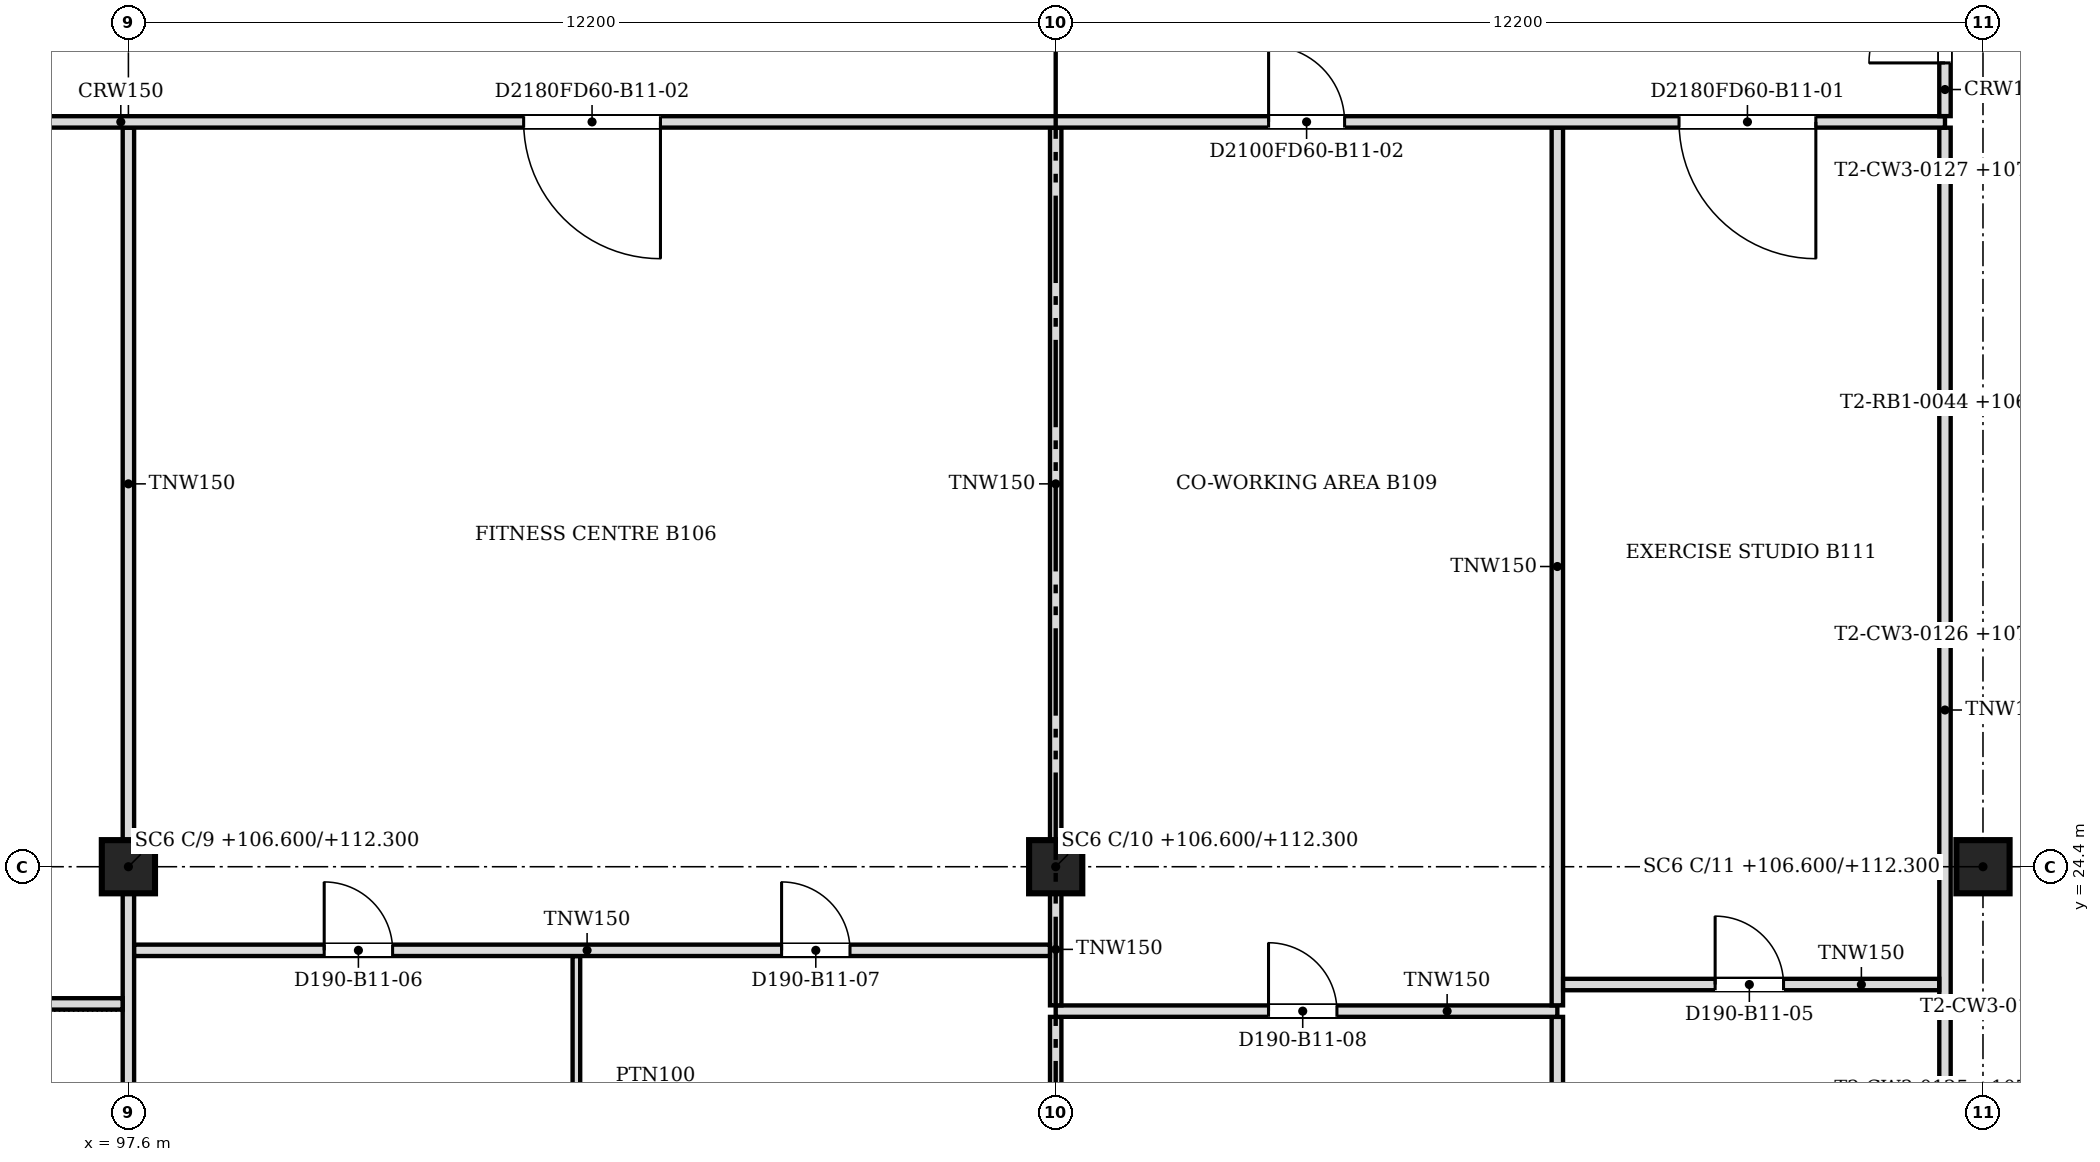
"""IFC4 building model, lengths in metres.
Left out: names, types, materials, properties, quantities, classifications, styles, units other than length and angle.
Written with IfcOpenShell. Run it as: python <this file> out.ifc"""

import sys

from ifc_helpers import new_model, si_unit, direction, frame, frame_2d, origin, origin_2d, place, context, subcontext, project, spatial, rectangle, extrude, source, transform, mapped, element, fill, save


model = new_model("IFC4")
c1 = context("Model", 3, precision=1e-05, world=origin(), true_north=direction((0.0, 1.0)))
c2 = subcontext(c1, "Body", "Model", "MODEL_VIEW")
j1 = project(units=[si_unit("LENGTHUNIT", "METRE"), si_unit("PLANEANGLEUNIT", "RADIAN")], contexts=[c1])
p1 = place(None, origin())
s1 = spatial("IfcSite", under=j1, at=p1, CompositionType="ELEMENT")
p2 = place(p1, origin())
s2 = spatial("IfcBuilding", under=s1, at=p2, CompositionType="ELEMENT")
p3 = place(p2, frame((0.0, 0.0, 106.6)))
s3 = spatial("IfcBuildingStorey", under=s2, at=p3, CompositionType="ELEMENT", Elevation=106.6)
for number, where, z_axis, x_axis in (
    (1, (97.6, 24.4, 0.0), (0.0, 0.0, 1.0), (1.0, 0.0, 0.0)),
    (2, (109.8, 24.4, 0.0), (0.0, 0.0, 1.0), (1.0, 0.0, 0.0)),
    (3, (122.0, 24.4, 0.0), (0.0, 0.0, 1.0), (1.0, 0.0, 0.0)),
):
    element("IfcColumn", number, at=place(p3, frame(where, z_axis=z_axis, x_axis=x_axis)), inside=s3, PredefinedType="COLUMN", context=c2, shape_type="SweptSolid", body=[
        extrude(rectangle(XDim=0.7, YDim=0.7, at=origin_2d()), origin(), (0.0, 0.0, 1.0), 5.7),
    ])
p4 = place(p3, frame((97.6, 18.8, 0.0), z_axis=(0.0, 0.0, 1.0), x_axis=(0.0, 1.0, 0.0)))
e4 = element("IfcWall", 4, at=p4, inside=s3, PredefinedType="PARTITIONING", context=c2, shape_type="SweptSolid", body=[
    extrude(rectangle(XDim=5.249, YDim=0.15, at=frame_2d((2.625, 0.0))), origin(), (0.0, 0.0, 1.0), 5.167),
])
p5 = place(p3, frame((103.494, 18.8, 0.0), z_axis=(0.0, 0.0, 1.0), x_axis=(0.0, 1.0, 0.0)))
e5 = element("IfcWall", 5, at=p5, inside=s3, PredefinedType="PARTITIONING", context=c2, shape_type="SweptSolid", body=[
    extrude(rectangle(XDim=4.424, YDim=0.1, at=frame_2d((2.212, 0.0))), origin(), (0.0, 0.0, 1.0), 5.167),
])
for number, where, z_axis, x_axis in (
    (6, (109.8, 18.8, 0.0), (0.0, 0.0, 1.0), (0.0, 1.0, 0.0)),
    (7, (116.4, 18.8, 0.0), (0.0, 0.0, 1.0), (0.0, 1.0, 0.0)),
):
    element("IfcWall", number, at=place(p3, frame(where, z_axis=z_axis, x_axis=x_axis)), inside=s3, PredefinedType="PARTITIONING", context=c2, shape_type="SweptSolid", body=[
        extrude(rectangle(XDim=3.624, YDim=0.15, at=frame_2d((1.812, 0.0))), origin(), (0.0, 0.0, 1.0), 5.167),
    ])
p6 = place(p3, frame((121.5, 18.8, 0.0), z_axis=(0.0, 0.0, 1.0), x_axis=(0.0, 1.0, 0.0)))
e8 = element("IfcWall", 8, at=p6, inside=s3, PredefinedType="PARTITIONING", context=c2, shape_type="SweptSolid", body=[
    extrude(rectangle(XDim=15.324, YDim=0.15, at=frame_2d((7.662, 0.0))), origin(), (0.0, 0.0, 1.0), 5.167),
])
p7 = place(p3, frame((116.4, 22.5, 0.0), z_axis=(0.0, 0.0, 1.0), x_axis=(-1.0, 0.0, 0.0)))
e9 = element("IfcWall", 9, at=p7, inside=s3, PredefinedType="PARTITIONING", context=c2, shape_type="SweptSolid", body=[
    extrude(rectangle(XDim=6.6, YDim=0.15, at=frame_2d((3.3, 0.0))), origin(), (0.0, 0.0, 1.0), 5.167),
])
m1 = source(origin(), c2, "Body", "SweptSolid", [
    extrude(rectangle(XDim=0.9, YDim=2.1, at=frame_2d((0.45, 1.05))), frame((0.0, 0.085, 0.0), z_axis=(0.0, -1.0, 0.0), x_axis=(1.0, 0.0, 0.0)), (0.0, 0.0, 1.0), 0.17),
])
p8 = place(p7, frame((2.9, 0.0, 0.0)))
e10 = element("IfcOpeningElement", 10, at=p8, cuts=e9, PredefinedType="OPENING", context=c2, shape_type="MappedRepresentation", body=[
    mapped(m1, transform((0.0, 0.0, 0.0), scale=1.0)),
])
p9 = place(p3, frame((97.524, 22.595, 0.0), z_axis=(0.0, 0.0, 1.0), x_axis=(-1.0, 0.0, 0.0)))
e11 = element("IfcWall", 11, at=p9, inside=s3, PredefinedType="PARTITIONING", context=c2, shape_type="SweptSolid", body=[
    extrude(rectangle(XDim=10.884, YDim=0.15, at=frame_2d((5.442, 0.0))), origin(), (0.0, 0.0, 1.0), 5.167),
])
p10 = place(p9, frame((8.884, 0.0, 0.0)))
e12 = element("IfcOpeningElement", 12, at=p10, cuts=e11, PredefinedType="OPENING", context=c2, shape_type="MappedRepresentation", body=[
    mapped(m1, transform((0.0, 0.0, 0.0), scale=1.0)),
])
p11 = place(p9, frame((1.35, 0.0, 0.0)))
e13 = element("IfcOpeningElement", 13, at=p11, cuts=e11, PredefinedType="OPENING", context=c2, shape_type="MappedRepresentation", body=[
    mapped(m1, transform((0.0, 0.0, 0.0), scale=1.0)),
])
p12 = place(p9, frame((5.224, 0.0, 0.0)))
e14 = element("IfcOpeningElement", 14, at=p12, cuts=e11, PredefinedType="OPENING", context=c2, shape_type="MappedRepresentation", body=[
    mapped(m1, transform((0.0, 0.0, 0.0), scale=1.0)),
])
p13 = place(p3, frame((109.8, 22.576, 0.0), z_axis=(0.0, 0.0, 1.0), x_axis=(0.0, 1.0, 0.0)))
e15 = element("IfcWall", 15, at=p13, inside=s3, PredefinedType="PARTITIONING", context=c2, shape_type="SweptSolid", body=[
    extrude(rectangle(XDim=1.473, YDim=0.15, at=frame_2d((0.737, 0.0))), origin(), (0.0, 0.0, 1.0), 5.167),
])
p14 = place(p3, frame((116.4, 22.576, 0.0), z_axis=(0.0, 0.0, 1.0), x_axis=(0.0, 1.0, 0.0)))
e16 = element("IfcWall", 16, at=p14, inside=s3, PredefinedType="PARTITIONING", context=c2, shape_type="SweptSolid", body=[
    extrude(rectangle(XDim=11.548, YDim=0.15, at=frame_2d((5.774, 0.0))), origin(), (0.0, 0.0, 1.0), 5.167),
])
p15 = place(p3, frame((121.424, 22.85, 0.0), z_axis=(0.0, 0.0, 1.0), x_axis=(-1.0, 0.0, 0.0)))
e17 = element("IfcWall", 17, at=p15, inside=s3, PredefinedType="PARTITIONING", context=c2, shape_type="SweptSolid", body=[
    extrude(rectangle(XDim=4.948, YDim=0.15, at=frame_2d((2.474, 0.0))), origin(), (0.0, 0.0, 1.0), 5.167),
])
p16 = place(p15, frame((2.048, 0.0, 0.0)))
e18 = element("IfcOpeningElement", 18, at=p16, cuts=e17, PredefinedType="OPENING", context=c2, shape_type="MappedRepresentation", body=[
    mapped(m1, transform((0.0, 0.0, 0.0), scale=1.0)),
])
p17 = place(p3, frame((109.724, 23.3, 0.0), z_axis=(0.0, 0.0, 1.0), x_axis=(-1.0, 0.0, 0.0)))
e19 = element("IfcWall", 19, at=p17, inside=s3, PredefinedType="PARTITIONING", context=c2, shape_type="SweptSolid", body=[
    extrude(rectangle(XDim=12.048, YDim=0.15, at=frame_2d((6.024, 0.0))), origin(), (0.0, 0.0, 1.0), 5.167),
])
p18 = place(p17, frame((8.648, 0.0, 0.0)))
e20 = element("IfcOpeningElement", 20, at=p18, cuts=e19, PredefinedType="OPENING", context=c2, shape_type="MappedRepresentation", body=[
    mapped(m1, transform((0.0, 0.0, 0.0), scale=1.0)),
])
p19 = place(p17, frame((2.63, 0.0, 0.0)))
e21 = element("IfcOpeningElement", 21, at=p19, cuts=e19, PredefinedType="OPENING", context=c2, shape_type="MappedRepresentation", body=[
    mapped(m1, transform((0.0, 0.0, 0.0), scale=1.0)),
])
for number, where, z_axis, x_axis in (
    (22, (97.6, 24.751, 0.0), (0.0, 0.0, 1.0), (0.0, 1.0, 0.0)),
    (23, (109.8, 24.751, 0.0), (0.0, 0.0, 1.0), (0.0, 1.0, 0.0)),
):
    element("IfcWall", number, at=place(p3, frame(where, z_axis=z_axis, x_axis=x_axis)), inside=s3, PredefinedType="PARTITIONING", context=c2, shape_type="SweptSolid", body=[
        extrude(rectangle(XDim=9.373, YDim=0.15, at=frame_2d((4.687, 0.0))), origin(), (0.0, 0.0, 1.0), 5.167),
    ])
p20 = place(p3, frame((121.5, 34.2, 0.0), z_axis=(0.0, 0.0, 1.0), x_axis=(-1.0, 0.0, 0.0)))
e24 = element("IfcWall", 24, at=p20, inside=s3, PredefinedType="PARTITIONING", context=c2, shape_type="SweptSolid", body=[
    extrude(rectangle(XDim=35.6, YDim=0.15, at=frame_2d((17.8, 0.0))), origin(), (0.0, 0.0, 1.0), 5.167),
])
m2 = source(origin(), c2, "Body", "SweptSolid", [
    extrude(rectangle(XDim=1.8, YDim=2.1, at=frame_2d((0.9, 1.05))), frame((0.0, 0.085, 0.0), z_axis=(0.0, -1.0, 0.0), x_axis=(1.0, 0.0, 0.0)), (0.0, 0.0, 1.0), 0.17),
])
p21 = place(p20, frame((1.699, 0.0, 0.0)))
e25 = element("IfcOpeningElement", 25, at=p21, cuts=e24, PredefinedType="OPENING", context=c2, shape_type="MappedRepresentation", body=[
    mapped(m2, transform((0.0, 0.0, 0.0), scale=1.0)),
])
m3 = source(origin(), c2, "Body", "SweptSolid", [
    extrude(rectangle(XDim=1.0, YDim=2.1, at=frame_2d((0.5, 1.05))), frame((0.0, 0.085, 0.0), z_axis=(0.0, -1.0, 0.0), x_axis=(1.0, 0.0, 0.0)), (0.0, 0.0, 1.0), 0.17),
])
p22 = place(p20, frame((7.899, 0.0, 0.0)))
e26 = element("IfcOpeningElement", 26, at=p22, cuts=e24, PredefinedType="OPENING", context=c2, shape_type="MappedRepresentation", body=[
    mapped(m3, transform((0.0, 0.0, 0.0), scale=1.0)),
])
p23 = place(p20, frame((29.3, 0.0, 0.0)))
e27 = element("IfcOpeningElement", 27, at=p23, cuts=e24, PredefinedType="OPENING", context=c2, shape_type="MappedRepresentation", body=[
    mapped(m3, transform((0.0, 0.0, 0.0), scale=1.0)),
])
p24 = place(p20, frame((16.9, 0.0, 0.0)))
e28 = element("IfcOpeningElement", 28, at=p24, cuts=e24, PredefinedType="OPENING", context=c2, shape_type="MappedRepresentation", body=[
    mapped(m2, transform((0.0, 0.0, 0.0), scale=1.0)),
])
p25 = place(p3, frame((121.5, 36.6, 0.0), z_axis=(0.0, 0.0, 1.0), x_axis=(0.0, -1.0, 0.0)))
e29 = element("IfcWall", 29, at=p25, inside=s3, PredefinedType="PARTITIONING", context=c2, shape_type="SweptSolid", body=[
    extrude(rectangle(XDim=2.324, YDim=0.15, at=frame_2d((1.162, 0.0))), origin(), (0.0, 0.0, 1.0), 5.167),
])
p26 = place(p25, frame((0.624, 0.0, 0.0)))
e30 = element("IfcOpeningElement", 30, at=p26, cuts=e29, PredefinedType="OPENING", context=c2, shape_type="MappedRepresentation", body=[
    mapped(m3, transform((0.0, 0.0, 0.0), scale=1.0)),
])
m4 = source(origin(), c2, "Body", "SweptSolid", [
    extrude(rectangle(XDim=0.9, YDim=2.1, at=frame_2d((0.45, 1.05))), frame((0.0, 0.025, 0.0), z_axis=(0.0, -1.0, 0.0), x_axis=(1.0, 0.0, 0.0)), (0.0, 0.0, 1.0), 0.05),
])
p27 = place(p16, origin())
e31 = element("IfcDoor", 31, at=p27, inside=s3, OperationType="SINGLE_SWING_RIGHT", PredefinedType="DOOR", context=c2, shape_type="MappedRepresentation", body=[
    mapped(m4, transform((0.0, 0.0, 0.0), scale=1.0)),
])
fill(e18, e31)
m5 = source(origin(), c2, "Body", "SweptSolid", [
    extrude(rectangle(XDim=1.8, YDim=2.1, at=frame_2d((0.9, 1.05))), frame((0.0, 0.025, 0.0), z_axis=(0.0, -1.0, 0.0), x_axis=(1.0, 0.0, 0.0)), (0.0, 0.0, 1.0), 0.05),
])
p28 = place(p21, origin())
e32 = element("IfcDoor", 32, at=p28, inside=s3, OperationType="DOUBLE_DOOR_SINGLE_SWING", PredefinedType="DOOR", context=c2, shape_type="MappedRepresentation", body=[
    mapped(m5, transform((0.0, 0.0, 0.0), scale=1.0)),
])
fill(e25, e32)
p29 = place(p18, origin())
e33 = element("IfcDoor", 33, at=p29, inside=s3, OperationType="SINGLE_SWING_RIGHT", PredefinedType="DOOR", context=c2, shape_type="MappedRepresentation", body=[
    mapped(m4, transform((0.0, 0.0, 0.0), scale=1.0)),
])
fill(e20, e33)
p30 = place(p19, origin())
e34 = element("IfcDoor", 34, at=p30, inside=s3, OperationType="SINGLE_SWING_RIGHT", PredefinedType="DOOR", context=c2, shape_type="MappedRepresentation", body=[
    mapped(m4, transform((0.0, 0.0, 0.0), scale=1.0)),
])
fill(e21, e34)
m6 = source(origin(), c2, "Body", "SweptSolid", [
    extrude(rectangle(XDim=1.0, YDim=2.1, at=frame_2d((0.5, 1.05))), frame((0.0, 0.025, 0.0), z_axis=(0.0, -1.0, 0.0), x_axis=(1.0, 0.0, 0.0)), (0.0, 0.0, 1.0), 0.05),
])
p31 = place(p22, origin())
e35 = element("IfcDoor", 35, at=p31, inside=s3, OperationType="SINGLE_SWING_RIGHT", PredefinedType="DOOR", context=c2, shape_type="MappedRepresentation", body=[
    mapped(m6, transform((0.0, 0.0, 0.0), scale=1.0)),
])
fill(e26, e35)
p32 = place(p8, origin())
e36 = element("IfcDoor", 36, at=p32, inside=s3, OperationType="SINGLE_SWING_RIGHT", PredefinedType="DOOR", context=c2, shape_type="MappedRepresentation", body=[
    mapped(m4, transform((0.0, 0.0, 0.0), scale=1.0)),
])
fill(e10, e36)
p33 = place(p24, origin())
e37 = element("IfcDoor", 37, at=p33, inside=s3, OperationType="DOUBLE_DOOR_SINGLE_SWING", PredefinedType="DOOR", context=c2, shape_type="MappedRepresentation", body=[
    mapped(m5, transform((0.0, 0.0, 0.0), scale=1.0)),
])
fill(e28, e37)
p34 = place(p26, origin())
e38 = element("IfcDoor", 38, at=p34, inside=s3, OperationType="SINGLE_SWING_RIGHT", PredefinedType="DOOR", context=c2, shape_type="MappedRepresentation", body=[
    mapped(m6, transform((0.0, 0.0, 0.0), scale=1.0)),
])
fill(e30, e38)
save(model, sys.argv[1])
